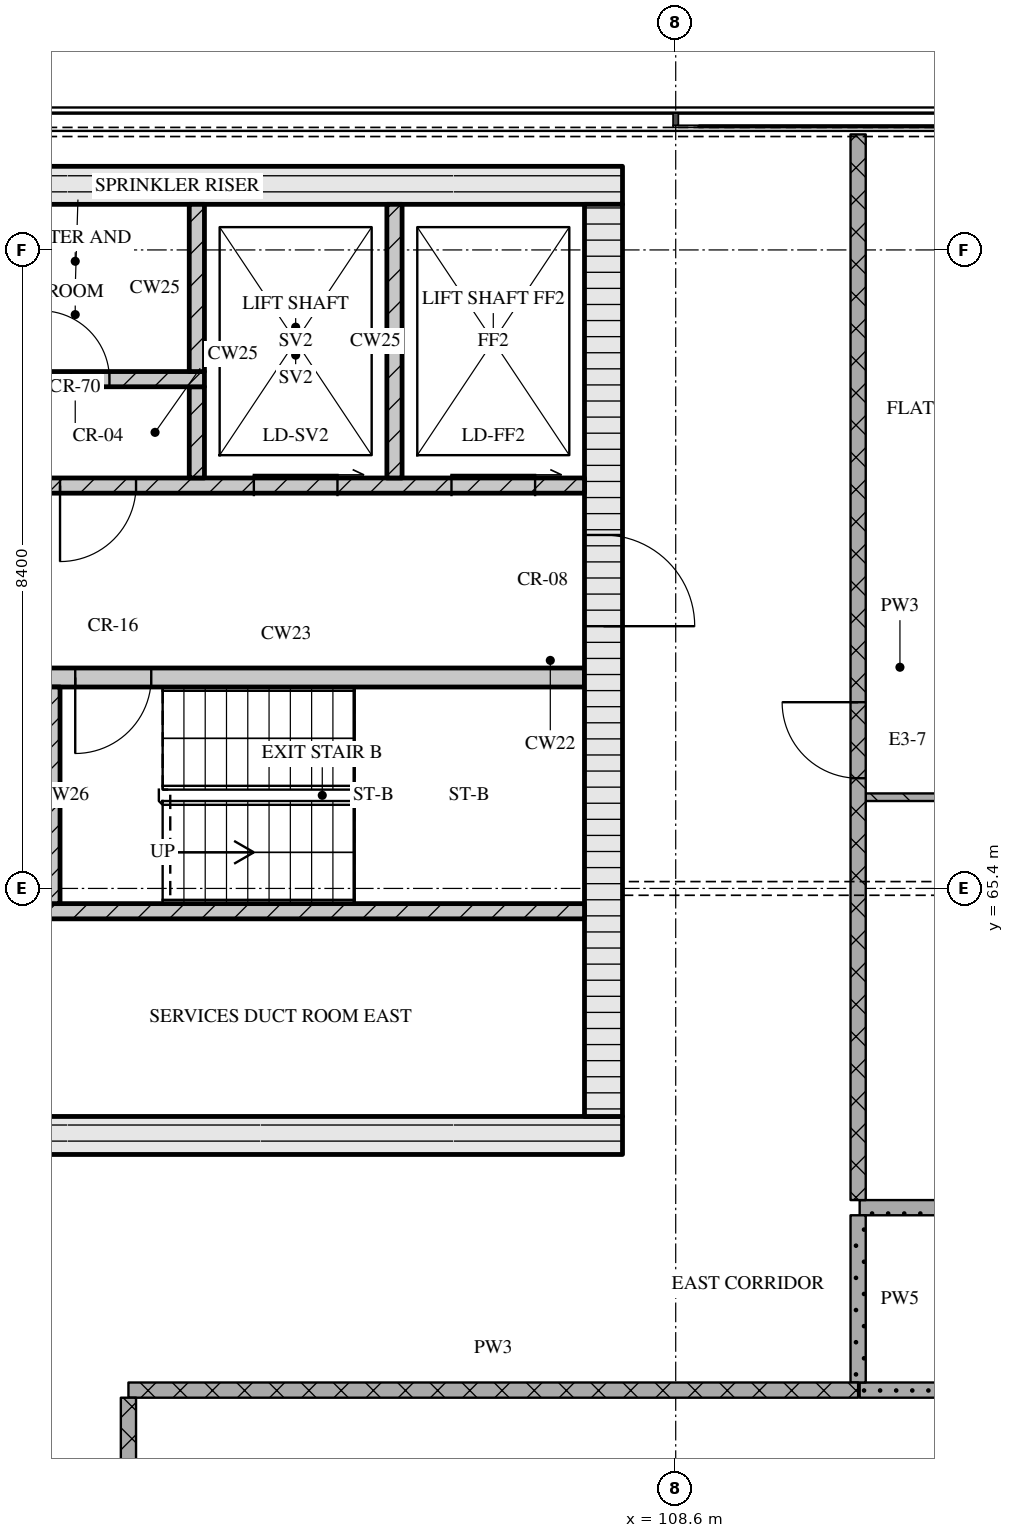
"""IFC4 building model, lengths in metres.
Left out: names, types, materials, properties, quantities, classifications, styles, units other than length and angle.
Written with IfcOpenShell. Run it as: python <this file> out.ifc"""

import sys

from ifc_helpers import new_model, si_unit, direction, frame, frame_2d, origin, place, context, subcontext, project, spatial, rectangle, extrude, element, fill, save


model = new_model("IFC4")
c1 = context("Model", 3, precision=1e-05, world=origin(), true_north=direction((0.0, 1.0)))
c2 = subcontext(c1, "Body", "Model", "MODEL_VIEW")
j1 = project(units=[si_unit("LENGTHUNIT", "METRE"), si_unit("PLANEANGLEUNIT", "RADIAN")], contexts=[c1])
p1 = place(None, origin())
s1 = spatial("IfcSite", under=j1, at=p1, CompositionType="ELEMENT")
p2 = place(p1, origin())
s2 = spatial("IfcBuilding", under=s1, at=p2, CompositionType="ELEMENT")
p3 = place(p2, frame((0.0, 0.0, 274.35)))
s3 = spatial("IfcBuildingStorey", under=s2, at=p3, CompositionType="ELEMENT", Elevation=274.35)
p4 = place(p3, frame((67.3, 62.15, 0.0), z_axis=(0.0, 0.0, 1.0), x_axis=(1.0, 0.0, 0.0)))
e1 = element("IfcWall", 1, at=p4, inside=s3, PredefinedType="SOLIDWALL", context=c2, shape_type="SweptSolid", body=[
    extrude(rectangle(XDim=40.6, YDim=0.5, at=frame_2d((20.3, 0.0))), origin(), (0.0, 0.0, 1.0), 3.32),
])
p5 = place(p4, frame((20.65, 0.0, 0.0)))
e2 = element("IfcOpeningElement", 2, at=p5, cuts=e1, PredefinedType="OPENING", context=c2, shape_type="SweptSolid", body=[
    extrude(rectangle(XDim=1.8, YDim=2.1, at=frame_2d((0.9, 1.05))), frame((0.0, 0.26, 0.0), z_axis=(0.0, -1.0, 0.0), x_axis=(1.0, 0.0, 0.0)), (0.0, 0.0, 1.0), 0.52),
])
p6 = place(p3, frame((67.3, 74.65, 0.0), z_axis=(0.0, 0.0, 1.0), x_axis=(1.0, 0.0, 0.0)))
e3 = element("IfcWall", 3, at=p6, inside=s3, PredefinedType="SOLIDWALL", context=c2, shape_type="SweptSolid", body=[
    extrude(rectangle(XDim=40.6, YDim=0.5, at=frame_2d((20.3, 0.0))), origin(), (0.0, 0.0, 1.0), 3.32),
])
p7 = place(p3, frame((107.65, 62.4, 0.0), z_axis=(0.0, 0.0, 1.0), x_axis=(0.0, 1.0, 0.0)))
e4 = element("IfcWall", 4, at=p7, inside=s3, PredefinedType="SOLIDWALL", context=c2, shape_type="SweptSolid", body=[
    extrude(rectangle(XDim=12.0, YDim=0.5, at=frame_2d((6.0, 0.0))), origin(), (0.0, 0.0, 1.0), 3.32),
])
p8 = place(p7, frame((6.45, 0.0, 0.0)))
e5 = element("IfcOpeningElement", 5, at=p8, cuts=e4, PredefinedType="OPENING", context=c2, shape_type="SweptSolid", body=[
    extrude(rectangle(XDim=1.2, YDim=2.1, at=frame_2d((0.6, 1.05))), frame((0.0, 0.26, 0.0), z_axis=(0.0, -1.0, 0.0), x_axis=(1.0, 0.0, 0.0)), (0.0, 0.0, 1.0), 0.52),
])
p9 = place(p3, frame((91.4, 65.1, 0.0), z_axis=(0.0, 0.0, 1.0), x_axis=(1.0, 0.0, 0.0)))
e6 = element("IfcWall", 6, at=p9, inside=s3, PredefinedType="SOLIDWALL", context=c2, shape_type="SweptSolid", body=[
    extrude(rectangle(XDim=16.0, YDim=0.2, at=frame_2d((8.0, 0.0))), origin(), (0.0, 0.0, 1.0), 3.32),
])
p10 = place(p9, frame((0.85, 0.0, 0.0)))
e7 = element("IfcOpeningElement", 7, at=p10, cuts=e6, PredefinedType="OPENING", context=c2, shape_type="SweptSolid", body=[
    extrude(rectangle(XDim=1.1, YDim=2.1, at=frame_2d((0.55, 1.05))), frame((0.0, 0.11, 0.0), z_axis=(0.0, -1.0, 0.0), x_axis=(1.0, 0.0, 0.0)), (0.0, 0.0, 1.0), 0.22),
])
p11 = place(p9, frame((3.35, 0.0, 0.0)))
e8 = element("IfcOpeningElement", 8, at=p11, cuts=e6, PredefinedType="OPENING", context=c2, shape_type="SweptSolid", body=[
    extrude(rectangle(XDim=1.1, YDim=2.1, at=frame_2d((0.55, 1.05))), frame((0.0, 0.11, 0.0), z_axis=(0.0, -1.0, 0.0), x_axis=(1.0, 0.0, 0.0)), (0.0, 0.0, 1.0), 0.22),
])
p12 = place(p9, frame((5.85, 0.0, 0.0)))
e9 = element("IfcOpeningElement", 9, at=p12, cuts=e6, PredefinedType="OPENING", context=c2, shape_type="SweptSolid", body=[
    extrude(rectangle(XDim=1.1, YDim=2.1, at=frame_2d((0.55, 1.05))), frame((0.0, 0.11, 0.0), z_axis=(0.0, -1.0, 0.0), x_axis=(1.0, 0.0, 0.0)), (0.0, 0.0, 1.0), 0.22),
])
p13 = place(p9, frame((7.83, 0.0, 0.0)))
e10 = element("IfcOpeningElement", 10, at=p13, cuts=e6, PredefinedType="OPENING", context=c2, shape_type="SweptSolid", body=[
    extrude(rectangle(XDim=0.9, YDim=2.1, at=frame_2d((0.45, 1.05))), frame((0.0, 0.11, 0.0), z_axis=(0.0, -1.0, 0.0), x_axis=(1.0, 0.0, 0.0)), (0.0, 0.0, 1.0), 0.22),
])
p14 = place(p3, frame((100.35, 65.2, 0.0), z_axis=(0.0, 0.0, 1.0), x_axis=(0.0, 1.0, 0.0)))
e11 = element("IfcWall", 11, at=p14, inside=s3, PredefinedType="SOLIDWALL", context=c2, shape_type="SweptSolid", body=[
    extrude(rectangle(XDim=2.85, YDim=0.3, at=frame_2d((1.425, 0.0))), origin(), (0.0, 0.0, 1.0), 3.32),
])
p15 = place(p3, frame((98.95, 68.175, 0.0), z_axis=(0.0, 0.0, 1.0), x_axis=(1.0, 0.0, 0.0)))
e12 = element("IfcWall", 12, at=p15, inside=s3, PredefinedType="SOLIDWALL", context=c2, shape_type="SweptSolid", body=[
    extrude(rectangle(XDim=8.45, YDim=0.25, at=frame_2d((4.225, 0.0))), origin(), (0.0, 0.0, 1.0), 3.32),
])
p16 = place(p15, frame((0.45, 0.0, 0.0)))
e13 = element("IfcOpeningElement", 13, at=p16, cuts=e12, PredefinedType="OPENING", context=c2, shape_type="SweptSolid", body=[
    extrude(rectangle(XDim=0.8, YDim=2.1, at=frame_2d((0.4, 1.05))), frame((0.0, 0.135, 0.0), z_axis=(0.0, -1.0, 0.0), x_axis=(1.0, 0.0, 0.0)), (0.0, 0.0, 1.0), 0.27),
])
p17 = place(p15, frame((1.75, 0.0, 0.0)))
e14 = element("IfcOpeningElement", 14, at=p17, cuts=e12, PredefinedType="OPENING", context=c2, shape_type="SweptSolid", body=[
    extrude(rectangle(XDim=1.0, YDim=2.1, at=frame_2d((0.5, 1.05))), frame((0.0, 0.135, 0.0), z_axis=(0.0, -1.0, 0.0), x_axis=(1.0, 0.0, 0.0)), (0.0, 0.0, 1.0), 0.27),
])
p18 = place(p3, frame((67.8, 70.7, 0.0), z_axis=(0.0, 0.0, 1.0), x_axis=(1.0, 0.0, 0.0)))
e15 = element("IfcWall", 15, at=p18, inside=s3, PredefinedType="SOLIDWALL", context=c2, shape_type="SweptSolid", body=[
    extrude(rectangle(XDim=39.6, YDim=0.2, at=frame_2d((19.8, 0.0))), origin(), (0.0, 0.0, 1.0), 3.32),
])
p19 = place(p18, frame((0.65, 0.0, 0.0)))
e16 = element("IfcOpeningElement", 16, at=p19, cuts=e15, PredefinedType="OPENING", context=c2, shape_type="SweptSolid", body=[
    extrude(rectangle(XDim=1.1, YDim=2.1, at=frame_2d((0.55, 1.05))), frame((0.0, 0.11, 0.0), z_axis=(0.0, -1.0, 0.0), x_axis=(1.0, 0.0, 0.0)), (0.0, 0.0, 1.0), 0.22),
])
p20 = place(p18, frame((3.25, 0.0, 0.0)))
e17 = element("IfcOpeningElement", 17, at=p20, cuts=e15, PredefinedType="OPENING", context=c2, shape_type="SweptSolid", body=[
    extrude(rectangle(XDim=1.1, YDim=2.1, at=frame_2d((0.55, 1.05))), frame((0.0, 0.11, 0.0), z_axis=(0.0, -1.0, 0.0), x_axis=(1.0, 0.0, 0.0)), (0.0, 0.0, 1.0), 0.22),
])
p21 = place(p18, frame((5.9, 0.0, 0.0)))
e18 = element("IfcOpeningElement", 18, at=p21, cuts=e15, PredefinedType="OPENING", context=c2, shape_type="SweptSolid", body=[
    extrude(rectangle(XDim=1.0, YDim=2.1, at=frame_2d((0.5, 1.05))), frame((0.0, 0.11, 0.0), z_axis=(0.0, -1.0, 0.0), x_axis=(1.0, 0.0, 0.0)), (0.0, 0.0, 1.0), 0.22),
])
p22 = place(p18, frame((21.7, 0.0, 0.0)))
e19 = element("IfcOpeningElement", 19, at=p22, cuts=e15, PredefinedType="OPENING", context=c2, shape_type="SweptSolid", body=[
    extrude(rectangle(XDim=1.0, YDim=2.1, at=frame_2d((0.5, 1.05))), frame((0.0, 0.11, 0.0), z_axis=(0.0, -1.0, 0.0), x_axis=(1.0, 0.0, 0.0)), (0.0, 0.0, 1.0), 0.22),
])
p23 = place(p18, frame((32.7, 0.0, 0.0)))
e20 = element("IfcOpeningElement", 20, at=p23, cuts=e15, PredefinedType="OPENING", context=c2, shape_type="SweptSolid", body=[
    extrude(rectangle(XDim=1.0, YDim=2.1, at=frame_2d((0.5, 1.05))), frame((0.0, 0.11, 0.0), z_axis=(0.0, -1.0, 0.0), x_axis=(1.0, 0.0, 0.0)), (0.0, 0.0, 1.0), 0.22),
])
p24 = place(p18, frame((35.25, 0.0, 0.0)))
e21 = element("IfcOpeningElement", 21, at=p24, cuts=e15, PredefinedType="OPENING", context=c2, shape_type="SweptSolid", body=[
    extrude(rectangle(XDim=1.1, YDim=2.1, at=frame_2d((0.55, 1.05))), frame((0.0, 0.11, 0.0), z_axis=(0.0, -1.0, 0.0), x_axis=(1.0, 0.0, 0.0)), (0.0, 0.0, 1.0), 0.22),
])
p25 = place(p18, frame((37.85, 0.0, 0.0)))
e22 = element("IfcOpeningElement", 22, at=p25, cuts=e15, PredefinedType="OPENING", context=c2, shape_type="SweptSolid", body=[
    extrude(rectangle(XDim=1.1, YDim=2.1, at=frame_2d((0.55, 1.05))), frame((0.0, 0.11, 0.0), z_axis=(0.0, -1.0, 0.0), x_axis=(1.0, 0.0, 0.0)), (0.0, 0.0, 1.0), 0.22),
])
p26 = place(p3, frame((102.3, 70.8, 0.0), z_axis=(0.0, 0.0, 1.0), x_axis=(0.0, 1.0, 0.0)))
e23 = element("IfcWall", 23, at=p26, inside=s3, PredefinedType="SOLIDWALL", context=c2, shape_type="SweptSolid", body=[
    extrude(rectangle(XDim=1.2, YDim=0.2, at=frame_2d((0.6, 0.0))), origin(), (0.0, 0.0, 1.0), 3.32),
])
p27 = place(p3, frame((104.9, 70.8, 0.0), z_axis=(0.0, 0.0, 1.0), x_axis=(0.0, 1.0, 0.0)))
e24 = element("IfcWall", 24, at=p27, inside=s3, PredefinedType="SOLIDWALL", context=c2, shape_type="SweptSolid", body=[
    extrude(rectangle(XDim=3.6, YDim=0.2, at=frame_2d((1.8, 0.0))), origin(), (0.0, 0.0, 1.0), 3.32),
])
p28 = place(p3, frame((95.08, 72.1, 0.0), z_axis=(0.0, 0.0, 1.0), x_axis=(1.0, 0.0, 0.0)))
e25 = element("IfcWall", 25, at=p28, inside=s3, PredefinedType="SOLIDWALL", context=c2, shape_type="SweptSolid", body=[
    extrude(rectangle(XDim=7.32, YDim=0.2, at=frame_2d((3.66, 0.0))), origin(), (0.0, 0.0, 1.0), 3.32),
])
p29 = place(p28, frame((0.52, 0.0, 0.0)))
e26 = element("IfcOpeningElement", 26, at=p29, cuts=e25, PredefinedType="OPENING", context=c2, shape_type="SweptSolid", body=[
    extrude(rectangle(XDim=0.9, YDim=2.1, at=frame_2d((0.45, 1.05))), frame((0.0, 0.11, 0.0), z_axis=(0.0, -1.0, 0.0), x_axis=(1.0, 0.0, 0.0)), (0.0, 0.0, 1.0), 0.22),
])
p30 = place(p28, frame((2.48, 0.0, 0.0)))
e27 = element("IfcOpeningElement", 27, at=p30, cuts=e25, PredefinedType="OPENING", context=c2, shape_type="SweptSolid", body=[
    extrude(rectangle(XDim=0.9, YDim=2.1, at=frame_2d((0.45, 1.05))), frame((0.0, 0.11, 0.0), z_axis=(0.0, -1.0, 0.0), x_axis=(1.0, 0.0, 0.0)), (0.0, 0.0, 1.0), 0.22),
])
p31 = place(p28, frame((5.17, 0.0, 0.0)))
e28 = element("IfcOpeningElement", 28, at=p31, cuts=e25, PredefinedType="OPENING", context=c2, shape_type="SweptSolid", body=[
    extrude(rectangle(XDim=0.9, YDim=2.1, at=frame_2d((0.45, 1.05))), frame((0.0, 0.11, 0.0), z_axis=(0.0, -1.0, 0.0), x_axis=(1.0, 0.0, 0.0)), (0.0, 0.0, 1.0), 0.22),
])
p32 = place(p3, frame((102.3, 72.2, 0.0), z_axis=(0.0, 0.0, 1.0), x_axis=(0.0, 1.0, 0.0)))
e29 = element("IfcWall", 29, at=p32, inside=s3, PredefinedType="SOLIDWALL", context=c2, shape_type="SweptSolid", body=[
    extrude(rectangle(XDim=2.2, YDim=0.2, at=frame_2d((1.1, 0.0))), origin(), (0.0, 0.0, 1.0), 3.32),
])
p33 = place(p3, frame((101.4, 58.8, 0.0), z_axis=(0.0, 0.0, 1.0), x_axis=(1.0, 0.0, 0.0)))
e30 = element("IfcWall", 30, at=p33, inside=s3, PredefinedType="PARTITIONING", context=c2, shape_type="SweptSolid", body=[
    extrude(rectangle(XDim=9.6, YDim=0.2, at=frame_2d((4.8, 0.0))), origin(), (0.0, 0.0, 1.0), 3.32),
])
p34 = place(p3, frame((111.02, 58.8, 0.0), z_axis=(0.0, 0.0, 1.0), x_axis=(1.0, 0.0, 0.0)))
e31 = element("IfcWall", 31, at=p34, inside=s3, PredefinedType="PARTITIONING", context=c2, shape_type="SweptSolid", body=[
    extrude(rectangle(XDim=7.48, YDim=0.2, at=frame_2d((3.74, 0.0))), origin(), (0.0, 0.0, 1.0), 3.32),
])
p35 = place(p3, frame((111.02, 61.2, 0.0), z_axis=(0.0, 0.0, 1.0), x_axis=(1.0, 0.0, 0.0)))
e32 = element("IfcWall", 32, at=p35, inside=s3, PredefinedType="PARTITIONING", context=c2, shape_type="SweptSolid", body=[
    extrude(rectangle(XDim=2.66, YDim=0.2, at=frame_2d((1.33, 0.0))), origin(), (0.0, 0.0, 1.0), 3.32),
])
p36 = place(p3, frame((111.1, 66.6, 0.0), z_axis=(0.0, 0.0, 1.0), x_axis=(1.0, 0.0, 0.0)))
e33 = element("IfcWall", 33, at=p36, inside=s3, PredefinedType="PARTITIONING", context=c2, shape_type="SweptSolid", body=[
    extrude(rectangle(XDim=2.6, YDim=0.1, at=frame_2d((1.3, 0.0))), origin(), (0.0, 0.0, 1.0), 3.32),
])
p37 = place(p3, frame((101.4, 58.7, 0.0), z_axis=(0.0, 0.0, 1.0), x_axis=(0.0, -1.0, 0.0)))
e34 = element("IfcWall", 34, at=p37, inside=s3, PredefinedType="PARTITIONING", context=c2, shape_type="SweptSolid", body=[
    extrude(rectangle(XDim=8.0, YDim=0.2, at=frame_2d((4.0, 0.0))), origin(), (0.0, 0.0, 1.0), 3.32),
])
p38 = place(p37, frame((2.85, 0.0, 0.0)))
e35 = element("IfcOpeningElement", 35, at=p38, cuts=e34, PredefinedType="OPENING", context=c2, shape_type="SweptSolid", body=[
    extrude(rectangle(XDim=1.0, YDim=2.1, at=frame_2d((0.5, 1.05))), frame((0.0, 0.11, 0.0), z_axis=(0.0, -1.0, 0.0), x_axis=(1.0, 0.0, 0.0)), (0.0, 0.0, 1.0), 0.22),
])
p39 = place(p3, frame((111.0, 75.32, 0.0), z_axis=(0.0, 0.0, 1.0), x_axis=(0.0, -1.0, 0.0)))
e36 = element("IfcWall", 36, at=p39, inside=s3, PredefinedType="PARTITIONING", context=c2, shape_type="SweptSolid", body=[
    extrude(rectangle(XDim=14.02, YDim=0.2, at=frame_2d((7.01, 0.0))), origin(), (0.0, 0.0, 1.0), 3.32),
])
p40 = place(p39, frame((7.47, 0.0, 0.0)))
e37 = element("IfcOpeningElement", 37, at=p40, cuts=e36, PredefinedType="OPENING", context=c2, shape_type="SweptSolid", body=[
    extrude(rectangle(XDim=1.0, YDim=2.1, at=frame_2d((0.5, 1.05))), frame((0.0, 0.11, 0.0), z_axis=(0.0, -1.0, 0.0), x_axis=(1.0, 0.0, 0.0)), (0.0, 0.0, 1.0), 0.22),
])
p41 = place(p3, frame((111.0, 61.1, 0.0), z_axis=(0.0, 0.0, 1.0), x_axis=(0.0, -1.0, 0.0)))
e38 = element("IfcWall", 38, at=p41, inside=s3, PredefinedType="PARTITIONING", context=c2, shape_type="SweptSolid", body=[
    extrude(rectangle(XDim=2.2, YDim=0.2, at=frame_2d((1.1, 0.0))), origin(), (0.0, 0.0, 1.0), 3.32),
])
p42 = place(p17, origin())
e39 = element("IfcDoor", 39, at=p42, inside=s3, OperationType="SINGLE_SWING_RIGHT", PredefinedType="DOOR", context=c2, shape_type="SweptSolid", body=[
    extrude(rectangle(XDim=1.0, YDim=2.1, at=frame_2d((0.5, 1.05))), frame((0.0, 0.025, 0.0), z_axis=(0.0, -1.0, 0.0), x_axis=(1.0, 0.0, 0.0)), (0.0, 0.0, 1.0), 0.05),
])
fill(e14, e39)
p43 = place(p8, origin())
e40 = element("IfcDoor", 40, at=p43, inside=s3, OperationType="SINGLE_SWING_RIGHT", PredefinedType="DOOR", context=c2, shape_type="SweptSolid", body=[
    extrude(rectangle(XDim=1.2, YDim=2.1, at=frame_2d((0.6, 1.05))), frame((0.0, 0.025, 0.0), z_axis=(0.0, -1.0, 0.0), x_axis=(1.0, 0.0, 0.0)), (0.0, 0.0, 1.0), 0.05),
])
fill(e5, e40)
p44 = place(p23, origin())
e41 = element("IfcDoor", 41, at=p44, inside=s3, OperationType="SINGLE_SWING_RIGHT", PredefinedType="DOOR", context=c2, shape_type="SweptSolid", body=[
    extrude(rectangle(XDim=1.0, YDim=2.1, at=frame_2d((0.5, 1.05))), frame((0.0, 0.025, 0.0), z_axis=(0.0, -1.0, 0.0), x_axis=(1.0, 0.0, 0.0)), (0.0, 0.0, 1.0), 0.05),
])
fill(e20, e41)
p45 = place(p24, origin())
e42 = element("IfcDoor", 42, at=p45, inside=s3, OperationType="SLIDING_TO_RIGHT", PredefinedType="DOOR", context=c2, shape_type="SweptSolid", body=[
    extrude(rectangle(XDim=1.1, YDim=2.1, at=frame_2d((0.55, 1.05))), frame((0.0, 0.025, 0.0), z_axis=(0.0, -1.0, 0.0), x_axis=(1.0, 0.0, 0.0)), (0.0, 0.0, 1.0), 0.05),
])
fill(e21, e42)
p46 = place(p25, origin())
e43 = element("IfcDoor", 43, at=p46, inside=s3, OperationType="SLIDING_TO_RIGHT", PredefinedType="DOOR", context=c2, shape_type="SweptSolid", body=[
    extrude(rectangle(XDim=1.1, YDim=2.1, at=frame_2d((0.55, 1.05))), frame((0.0, 0.025, 0.0), z_axis=(0.0, -1.0, 0.0), x_axis=(1.0, 0.0, 0.0)), (0.0, 0.0, 1.0), 0.05),
])
fill(e22, e43)
p47 = place(p31, origin())
e44 = element("IfcDoor", 44, at=p47, inside=s3, OperationType="SINGLE_SWING_LEFT", PredefinedType="DOOR", context=c2, shape_type="SweptSolid", body=[
    extrude(rectangle(XDim=0.9, YDim=2.1, at=frame_2d((0.45, 1.05))), frame((0.0, 0.025, 0.0), z_axis=(0.0, -1.0, 0.0), x_axis=(1.0, 0.0, 0.0)), (0.0, 0.0, 1.0), 0.05),
])
fill(e28, e44)
p48 = place(p40, origin())
e45 = element("IfcDoor", 45, at=p48, inside=s3, OperationType="SINGLE_SWING_RIGHT", PredefinedType="DOOR", context=c2, shape_type="SweptSolid", body=[
    extrude(rectangle(XDim=1.0, YDim=2.1, at=frame_2d((0.5, 1.05))), frame((0.0, 0.025, 0.0), z_axis=(0.0, -1.0, 0.0), x_axis=(1.0, 0.0, 0.0)), (0.0, 0.0, 1.0), 0.05),
])
fill(e37, e45)
save(model, sys.argv[1])
